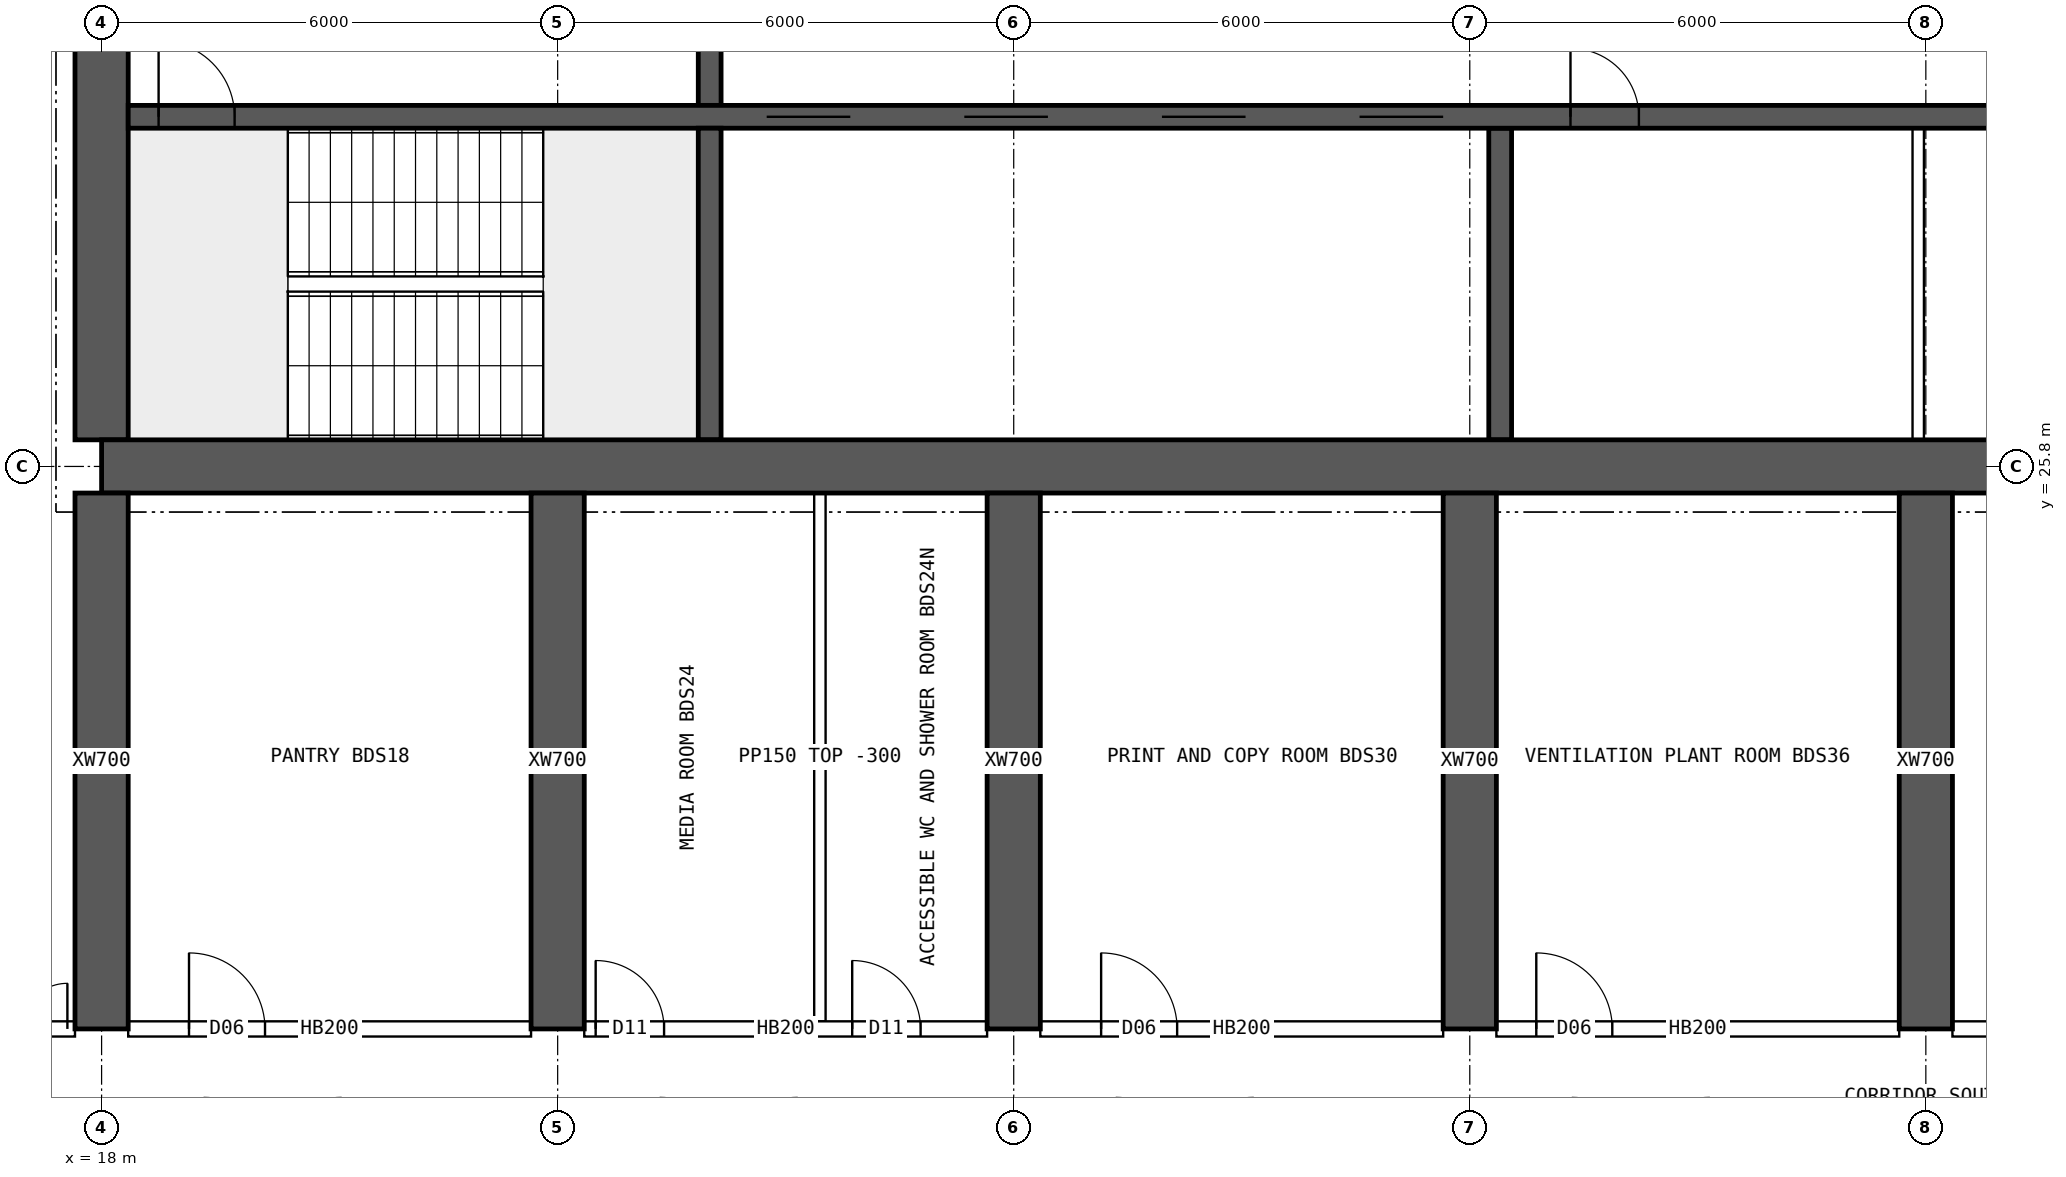
"""IFC4 building model, lengths in metres.
Left out: names, types, materials, properties, quantities, classifications, styles, units other than length and angle.
Written with IfcOpenShell. Run it as: python <this file> out.ifc"""

import sys

from ifc_helpers import new_model, si_unit, direction, frame, frame_2d, origin, place, context, subcontext, project, spatial, rectangle, extrude, element, fill, save


model = new_model("IFC4")
c1 = context("Model", 3, precision=1e-05, world=origin(), true_north=direction((0.0, 1.0)))
c2 = subcontext(c1, "Body", "Model", "MODEL_VIEW")
j1 = project(units=[si_unit("LENGTHUNIT", "METRE"), si_unit("PLANEANGLEUNIT", "RADIAN")], contexts=[c1])
p1 = place(None, origin())
s1 = spatial("IfcSite", under=j1, at=p1, CompositionType="ELEMENT")
p2 = place(p1, origin())
s2 = spatial("IfcBuilding", under=s1, at=p2, CompositionType="ELEMENT")
p3 = place(p2, frame((0.0, 0.0, 257.8)))
s3 = spatial("IfcBuildingStorey", under=s2, at=p3, CompositionType="ELEMENT", Elevation=257.8)
p4 = place(p3, frame((18.0, 25.8, 0.0), z_axis=(0.0, 0.0, 1.0), x_axis=(1.0, 0.0, 0.0)))
e1 = element("IfcWall", 1, at=p4, inside=s3, PredefinedType="SHEAR", context=c2, shape_type="SweptSolid", body=[
    extrude(rectangle(XDim=48.0, YDim=0.7, at=frame_2d((24.0, 0.0))), origin(), (0.0, 0.0, 1.0), 4.5),
])
p5 = place(p3, frame((18.0, 26.15, 0.0), z_axis=(0.0, 0.0, 1.0), x_axis=(0.0, 1.0, 0.0)))
e2 = element("IfcWall", 2, at=p5, inside=s3, PredefinedType="SHEAR", context=c2, shape_type="SweptSolid", body=[
    extrude(rectangle(XDim=11.7, YDim=0.7, at=frame_2d((5.85, 0.0))), origin(), (0.0, 0.0, 1.0), 4.5),
])
p6 = place(p5, frame((5.15, 0.0, 0.0)))
e3 = element("IfcOpeningElement", 3, at=p6, cuts=e2, PredefinedType="OPENING", context=c2, shape_type="SweptSolid", body=[
    extrude(rectangle(XDim=1.2, YDim=2.1, at=frame_2d((0.6, 1.05))), frame((0.0, 0.36, 0.0), z_axis=(0.0, -1.0, 0.0), x_axis=(1.0, 0.0, 0.0)), (0.0, 0.0, 1.0), 0.72),
])
p7 = place(p3, frame((18.35, 30.4, 0.0), z_axis=(0.0, 0.0, 1.0), x_axis=(1.0, 0.0, 0.0)))
e4 = element("IfcWall", 4, at=p7, inside=s3, PredefinedType="SHEAR", context=c2, shape_type="SweptSolid", body=[
    extrude(rectangle(XDim=47.3, YDim=0.3, at=frame_2d((23.65, 0.0))), origin(), (0.0, 0.0, 1.0), 4.5),
])
p8 = place(p7, frame((0.4, 0.0, 0.0)))
e5 = element("IfcOpeningElement", 5, at=p8, cuts=e4, PredefinedType="OPENING", context=c2, shape_type="SweptSolid", body=[
    extrude(rectangle(XDim=1.0, YDim=2.1, at=frame_2d((0.5, 1.05))), frame((0.0, 0.16, 0.0), z_axis=(0.0, -1.0, 0.0), x_axis=(1.0, 0.0, 0.0)), (0.0, 0.0, 1.0), 0.32),
])
p9 = place(p7, frame((45.9, 0.0, 0.0)))
e6 = element("IfcOpeningElement", 6, at=p9, cuts=e4, PredefinedType="OPENING", context=c2, shape_type="SweptSolid", body=[
    extrude(rectangle(XDim=1.0, YDim=2.1, at=frame_2d((0.5, 1.05))), frame((0.0, 0.16, 0.0), z_axis=(0.0, -1.0, 0.0), x_axis=(1.0, 0.0, 0.0)), (0.0, 0.0, 1.0), 0.32),
])
p10 = place(p7, frame((8.4, 0.0, 0.0)))
e7 = element("IfcOpeningElement", 7, at=p10, cuts=e4, PredefinedType="OPENING", context=c2, shape_type="SweptSolid", body=[
    extrude(rectangle(XDim=1.1, YDim=2.1, at=frame_2d((0.55, 1.05))), frame((0.0, 0.16, 0.0), z_axis=(0.0, -1.0, 0.0), x_axis=(1.0, 0.0, 0.0)), (0.0, 0.0, 1.0), 0.32),
])
p11 = place(p7, frame((11.0, 0.0, 0.0)))
e8 = element("IfcOpeningElement", 8, at=p11, cuts=e4, PredefinedType="OPENING", context=c2, shape_type="SweptSolid", body=[
    extrude(rectangle(XDim=1.1, YDim=2.1, at=frame_2d((0.55, 1.05))), frame((0.0, 0.16, 0.0), z_axis=(0.0, -1.0, 0.0), x_axis=(1.0, 0.0, 0.0)), (0.0, 0.0, 1.0), 0.32),
])
p12 = place(p7, frame((13.6, 0.0, 0.0)))
e9 = element("IfcOpeningElement", 9, at=p12, cuts=e4, PredefinedType="OPENING", context=c2, shape_type="SweptSolid", body=[
    extrude(rectangle(XDim=1.1, YDim=2.1, at=frame_2d((0.55, 1.05))), frame((0.0, 0.16, 0.0), z_axis=(0.0, -1.0, 0.0), x_axis=(1.0, 0.0, 0.0)), (0.0, 0.0, 1.0), 0.32),
])
p13 = place(p7, frame((16.2, 0.0, 0.0)))
e10 = element("IfcOpeningElement", 10, at=p13, cuts=e4, PredefinedType="OPENING", context=c2, shape_type="SweptSolid", body=[
    extrude(rectangle(XDim=1.1, YDim=2.1, at=frame_2d((0.55, 1.05))), frame((0.0, 0.16, 0.0), z_axis=(0.0, -1.0, 0.0), x_axis=(1.0, 0.0, 0.0)), (0.0, 0.0, 1.0), 0.32),
])
p14 = place(p7, frame((18.975, 0.0, 0.0)))
e11 = element("IfcOpeningElement", 11, at=p14, cuts=e4, PredefinedType="OPENING", context=c2, shape_type="SweptSolid", body=[
    extrude(rectangle(XDim=0.9, YDim=2.1, at=frame_2d((0.45, 1.05))), frame((0.0, 0.16, 0.0), z_axis=(0.0, -1.0, 0.0), x_axis=(1.0, 0.0, 0.0)), (0.0, 0.0, 1.0), 0.32),
])
p15 = place(p7, frame((24.475, 0.0, 0.0)))
e12 = element("IfcOpeningElement", 12, at=p15, cuts=e4, PredefinedType="OPENING", context=c2, shape_type="SweptSolid", body=[
    extrude(rectangle(XDim=0.9, YDim=2.1, at=frame_2d((0.45, 1.05))), frame((0.0, 0.16, 0.0), z_axis=(0.0, -1.0, 0.0), x_axis=(1.0, 0.0, 0.0)), (0.0, 0.0, 1.0), 0.32),
])
p16 = place(p7, frame((30.267, 0.0, 0.0)))
e13 = element("IfcOpeningElement", 13, at=p16, cuts=e4, PredefinedType="OPENING", context=c2, shape_type="SweptSolid", body=[
    extrude(rectangle(XDim=1.1, YDim=2.1, at=frame_2d((0.55, 1.05))), frame((0.0, 0.16, 0.0), z_axis=(0.0, -1.0, 0.0), x_axis=(1.0, 0.0, 0.0)), (0.0, 0.0, 1.0), 0.32),
])
p17 = place(p7, frame((33.8, 0.0, 0.0)))
e14 = element("IfcOpeningElement", 14, at=p17, cuts=e4, PredefinedType="OPENING", context=c2, shape_type="SweptSolid", body=[
    extrude(rectangle(XDim=1.1, YDim=2.1, at=frame_2d((0.55, 1.05))), frame((0.0, 0.16, 0.0), z_axis=(0.0, -1.0, 0.0), x_axis=(1.0, 0.0, 0.0)), (0.0, 0.0, 1.0), 0.32),
])
p18 = place(p7, frame((37.333, 0.0, 0.0)))
e15 = element("IfcOpeningElement", 15, at=p18, cuts=e4, PredefinedType="OPENING", context=c2, shape_type="SweptSolid", body=[
    extrude(rectangle(XDim=1.1, YDim=2.1, at=frame_2d((0.55, 1.05))), frame((0.0, 0.16, 0.0), z_axis=(0.0, -1.0, 0.0), x_axis=(1.0, 0.0, 0.0)), (0.0, 0.0, 1.0), 0.32),
])
p19 = place(p3, frame((26.0, 26.15, 0.0), z_axis=(0.0, 0.0, 1.0), x_axis=(0.0, 1.0, 0.0)))
e16 = element("IfcWall", 16, at=p19, inside=s3, PredefinedType="SHEAR", context=c2, shape_type="SweptSolid", body=[
    extrude(rectangle(XDim=4.1, YDim=0.3, at=frame_2d((2.05, 0.0))), origin(), (0.0, 0.0, 1.0), 4.5),
])
p20 = place(p3, frame((26.0, 30.55, 0.0), z_axis=(0.0, 0.0, 1.0), x_axis=(0.0, 1.0, 0.0)))
e17 = element("IfcWall", 17, at=p20, inside=s3, PredefinedType="SHEAR", context=c2, shape_type="SweptSolid", body=[
    extrude(rectangle(XDim=3.9, YDim=0.3, at=frame_2d((1.95, 0.0))), origin(), (0.0, 0.0, 1.0), 4.5),
])
p21 = place(p20, frame((1.4, 0.0, 0.0)))
e18 = element("IfcOpeningElement", 18, at=p21, cuts=e17, PredefinedType="OPENING", context=c2, shape_type="SweptSolid", body=[
    extrude(rectangle(XDim=1.2, YDim=2.1, at=frame_2d((0.6, 1.05))), frame((0.0, 0.16, 0.0), z_axis=(0.0, -1.0, 0.0), x_axis=(1.0, 0.0, 0.0)), (0.0, 0.0, 1.0), 0.32),
])
p22 = place(p3, frame((36.4, 26.15, 0.0), z_axis=(0.0, 0.0, 1.0), x_axis=(0.0, 1.0, 0.0)))
e19 = element("IfcWall", 19, at=p22, inside=s3, PredefinedType="SHEAR", context=c2, shape_type="SweptSolid", body=[
    extrude(rectangle(XDim=4.1, YDim=0.3, at=frame_2d((2.05, 0.0))), origin(), (0.0, 0.0, 1.0), 4.5),
])
for number, where, z_axis, x_axis in (
    (20, (18.0, 18.4, 0.0), (0.0, 0.0, 1.0), (0.0, 1.0, 0.0)),
    (21, (24.0, 18.4, 0.0), (0.0, 0.0, 1.0), (0.0, 1.0, 0.0)),
    (22, (30.0, 18.4, 0.0), (0.0, 0.0, 1.0), (0.0, 1.0, 0.0)),
    (23, (36.0, 18.4, 0.0), (0.0, 0.0, 1.0), (0.0, 1.0, 0.0)),
    (24, (42.0, 18.4, 0.0), (0.0, 0.0, 1.0), (0.0, 1.0, 0.0)),
):
    element("IfcWall", number, at=place(p3, frame(where, z_axis=z_axis, x_axis=x_axis)), inside=s3, PredefinedType="SHEAR", context=c2, shape_type="SweptSolid", body=[
        extrude(rectangle(XDim=7.05, YDim=0.7, at=frame_2d((3.525, 0.0))), origin(), (0.0, 0.0, 1.0), 4.5),
    ])
p23 = place(p3, frame((41.9, 26.15, 0.0), z_axis=(0.0, 0.0, 1.0), x_axis=(0.0, 1.0, 0.0)))
e25 = element("IfcWall", 25, at=p23, inside=s3, PredefinedType="SOLIDWALL", context=c2, shape_type="SweptSolid", body=[
    extrude(rectangle(XDim=4.1, YDim=0.15, at=frame_2d((2.05, 0.0))), origin(), (0.0, 0.0, 1.0), 4.2),
])
p24 = place(p3, frame((15.6, 18.4, 0.0), z_axis=(0.0, 0.0, 1.0), x_axis=(1.0, 0.0, 0.0)))
e26 = element("IfcWall", 26, at=p24, inside=s3, PredefinedType="SOLIDWALL", context=c2, shape_type="SweptSolid", body=[
    extrude(rectangle(XDim=2.05, YDim=0.2, at=frame_2d((1.025, 0.0))), origin(), (0.0, 0.0, 1.0), 4.2),
])
p25 = place(p24, frame((0.75, 0.0, 0.0)))
e27 = element("IfcOpeningElement", 27, at=p25, cuts=e26, PredefinedType="OPENING", context=c2, shape_type="SweptSolid", body=[
    extrude(rectangle(XDim=1.2, YDim=2.1, at=frame_2d((0.6, 1.05))), frame((0.0, 0.11, 0.0), z_axis=(0.0, -1.0, 0.0), x_axis=(1.0, 0.0, 0.0)), (0.0, 0.0, 1.0), 0.22),
])
p26 = place(p3, frame((18.35, 18.4, 0.0), z_axis=(0.0, 0.0, 1.0), x_axis=(1.0, 0.0, 0.0)))
e28 = element("IfcWall", 28, at=p26, inside=s3, PredefinedType="SOLIDWALL", context=c2, shape_type="SweptSolid", body=[
    extrude(rectangle(XDim=5.3, YDim=0.2, at=frame_2d((2.65, 0.0))), origin(), (0.0, 0.0, 1.0), 4.2),
])
p27 = place(p26, frame((0.8, 0.0, 0.0)))
e29 = element("IfcOpeningElement", 29, at=p27, cuts=e28, PredefinedType="OPENING", context=c2, shape_type="SweptSolid", body=[
    extrude(rectangle(XDim=1.0, YDim=2.1, at=frame_2d((0.5, 1.05))), frame((0.0, 0.11, 0.0), z_axis=(0.0, -1.0, 0.0), x_axis=(1.0, 0.0, 0.0)), (0.0, 0.0, 1.0), 0.22),
])
p28 = place(p3, frame((24.35, 18.4, 0.0), z_axis=(0.0, 0.0, 1.0), x_axis=(1.0, 0.0, 0.0)))
e30 = element("IfcWall", 30, at=p28, inside=s3, PredefinedType="SOLIDWALL", context=c2, shape_type="SweptSolid", body=[
    extrude(rectangle(XDim=5.3, YDim=0.2, at=frame_2d((2.65, 0.0))), origin(), (0.0, 0.0, 1.0), 4.2),
])
p29 = place(p28, frame((0.15, 0.0, 0.0)))
e31 = element("IfcOpeningElement", 31, at=p29, cuts=e30, PredefinedType="OPENING", context=c2, shape_type="SweptSolid", body=[
    extrude(rectangle(XDim=0.9, YDim=2.1, at=frame_2d((0.45, 1.05))), frame((0.0, 0.11, 0.0), z_axis=(0.0, -1.0, 0.0), x_axis=(1.0, 0.0, 0.0)), (0.0, 0.0, 1.0), 0.22),
])
p30 = place(p28, frame((3.525, 0.0, 0.0)))
e32 = element("IfcOpeningElement", 32, at=p30, cuts=e30, PredefinedType="OPENING", context=c2, shape_type="SweptSolid", body=[
    extrude(rectangle(XDim=0.9, YDim=2.1, at=frame_2d((0.45, 1.05))), frame((0.0, 0.11, 0.0), z_axis=(0.0, -1.0, 0.0), x_axis=(1.0, 0.0, 0.0)), (0.0, 0.0, 1.0), 0.22),
])
p31 = place(p3, frame((30.35, 18.4, 0.0), z_axis=(0.0, 0.0, 1.0), x_axis=(1.0, 0.0, 0.0)))
e33 = element("IfcWall", 33, at=p31, inside=s3, PredefinedType="SOLIDWALL", context=c2, shape_type="SweptSolid", body=[
    extrude(rectangle(XDim=5.3, YDim=0.2, at=frame_2d((2.65, 0.0))), origin(), (0.0, 0.0, 1.0), 4.2),
])
p32 = place(p31, frame((0.8, 0.0, 0.0)))
e34 = element("IfcOpeningElement", 34, at=p32, cuts=e33, PredefinedType="OPENING", context=c2, shape_type="SweptSolid", body=[
    extrude(rectangle(XDim=1.0, YDim=2.1, at=frame_2d((0.5, 1.05))), frame((0.0, 0.11, 0.0), z_axis=(0.0, -1.0, 0.0), x_axis=(1.0, 0.0, 0.0)), (0.0, 0.0, 1.0), 0.22),
])
p33 = place(p3, frame((36.35, 18.4, 0.0), z_axis=(0.0, 0.0, 1.0), x_axis=(1.0, 0.0, 0.0)))
e35 = element("IfcWall", 35, at=p33, inside=s3, PredefinedType="SOLIDWALL", context=c2, shape_type="SweptSolid", body=[
    extrude(rectangle(XDim=5.3, YDim=0.2, at=frame_2d((2.65, 0.0))), origin(), (0.0, 0.0, 1.0), 4.2),
])
p34 = place(p33, frame((0.525, 0.0, 0.0)))
e36 = element("IfcOpeningElement", 36, at=p34, cuts=e35, PredefinedType="OPENING", context=c2, shape_type="SweptSolid", body=[
    extrude(rectangle(XDim=1.0, YDim=2.1, at=frame_2d((0.5, 1.05))), frame((0.0, 0.11, 0.0), z_axis=(0.0, -1.0, 0.0), x_axis=(1.0, 0.0, 0.0)), (0.0, 0.0, 1.0), 0.22),
])
p35 = place(p3, frame((42.35, 18.4, 0.0), z_axis=(0.0, 0.0, 1.0), x_axis=(1.0, 0.0, 0.0)))
e37 = element("IfcWall", 37, at=p35, inside=s3, PredefinedType="SOLIDWALL", context=c2, shape_type="SweptSolid", body=[
    extrude(rectangle(XDim=5.3, YDim=0.2, at=frame_2d((2.65, 0.0))), origin(), (0.0, 0.0, 1.0), 4.2),
])
p36 = place(p35, frame((0.8, 0.0, 0.0)))
e38 = element("IfcOpeningElement", 38, at=p36, cuts=e37, PredefinedType="OPENING", context=c2, shape_type="SweptSolid", body=[
    extrude(rectangle(XDim=1.0, YDim=2.1, at=frame_2d((0.5, 1.05))), frame((0.0, 0.11, 0.0), z_axis=(0.0, -1.0, 0.0), x_axis=(1.0, 0.0, 0.0)), (0.0, 0.0, 1.0), 0.22),
])
p37 = place(p3, frame((27.45, 18.5, 0.0), z_axis=(0.0, 0.0, 1.0), x_axis=(0.0, 1.0, 0.0)))
e39 = element("IfcWall", 39, at=p37, inside=s3, PredefinedType="PARTITIONING", context=c2, shape_type="SweptSolid", body=[
    extrude(rectangle(XDim=6.95, YDim=0.15, at=frame_2d((3.475, 0.0))), origin(), (0.0, 0.0, 1.0), 4.2),
])
p38 = place(p8, origin())
e40 = element("IfcDoor", 40, at=p38, inside=s3, OperationType="SINGLE_SWING_LEFT", PredefinedType="DOOR", context=c2, shape_type="SweptSolid", body=[
    extrude(rectangle(XDim=1.0, YDim=2.1, at=frame_2d((0.5, 1.05))), frame((0.0, 0.025, 0.0), z_axis=(0.0, -1.0, 0.0), x_axis=(1.0, 0.0, 0.0)), (0.0, 0.0, 1.0), 0.05),
])
fill(e5, e40)
p39 = place(p10, origin())
e41 = element("IfcDoor", 41, at=p39, inside=s3, OperationType="DOUBLE_DOOR_SLIDING", PredefinedType="DOOR", context=c2, shape_type="SweptSolid", body=[
    extrude(rectangle(XDim=1.1, YDim=2.1, at=frame_2d((0.55, 1.05))), frame((0.0, 0.025, 0.0), z_axis=(0.0, -1.0, 0.0), x_axis=(1.0, 0.0, 0.0)), (0.0, 0.0, 1.0), 0.05),
])
fill(e7, e41)
p40 = place(p11, origin())
e42 = element("IfcDoor", 42, at=p40, inside=s3, OperationType="DOUBLE_DOOR_SLIDING", PredefinedType="DOOR", context=c2, shape_type="SweptSolid", body=[
    extrude(rectangle(XDim=1.1, YDim=2.1, at=frame_2d((0.55, 1.05))), frame((0.0, 0.025, 0.0), z_axis=(0.0, -1.0, 0.0), x_axis=(1.0, 0.0, 0.0)), (0.0, 0.0, 1.0), 0.05),
])
fill(e8, e42)
p41 = place(p12, origin())
e43 = element("IfcDoor", 43, at=p41, inside=s3, OperationType="DOUBLE_DOOR_SLIDING", PredefinedType="DOOR", context=c2, shape_type="SweptSolid", body=[
    extrude(rectangle(XDim=1.1, YDim=2.1, at=frame_2d((0.55, 1.05))), frame((0.0, 0.025, 0.0), z_axis=(0.0, -1.0, 0.0), x_axis=(1.0, 0.0, 0.0)), (0.0, 0.0, 1.0), 0.05),
])
fill(e9, e43)
p42 = place(p13, origin())
e44 = element("IfcDoor", 44, at=p42, inside=s3, OperationType="DOUBLE_DOOR_SLIDING", PredefinedType="DOOR", context=c2, shape_type="SweptSolid", body=[
    extrude(rectangle(XDim=1.1, YDim=2.1, at=frame_2d((0.55, 1.05))), frame((0.0, 0.025, 0.0), z_axis=(0.0, -1.0, 0.0), x_axis=(1.0, 0.0, 0.0)), (0.0, 0.0, 1.0), 0.05),
])
fill(e10, e44)
p43 = place(p14, origin())
e45 = element("IfcDoor", 45, at=p43, inside=s3, OperationType="SINGLE_SWING_LEFT", PredefinedType="DOOR", context=c2, shape_type="SweptSolid", body=[
    extrude(rectangle(XDim=0.9, YDim=2.1, at=frame_2d((0.45, 1.05))), frame((0.0, 0.025, 0.0), z_axis=(0.0, -1.0, 0.0), x_axis=(1.0, 0.0, 0.0)), (0.0, 0.0, 1.0), 0.05),
])
fill(e11, e45)
p44 = place(p25, origin())
e46 = element("IfcDoor", 46, at=p44, inside=s3, OperationType="DOUBLE_DOOR_SINGLE_SWING", PredefinedType="DOOR", context=c2, shape_type="SweptSolid", body=[
    extrude(rectangle(XDim=1.2, YDim=2.1, at=frame_2d((0.6, 1.05))), frame((0.0, 0.025, 0.0), z_axis=(0.0, -1.0, 0.0), x_axis=(1.0, 0.0, 0.0)), (0.0, 0.0, 1.0), 0.05),
])
fill(e27, e46)
p45 = place(p27, origin())
e47 = element("IfcDoor", 47, at=p45, inside=s3, OperationType="SINGLE_SWING_LEFT", PredefinedType="DOOR", context=c2, shape_type="SweptSolid", body=[
    extrude(rectangle(XDim=1.0, YDim=2.1, at=frame_2d((0.5, 1.05))), frame((0.0, 0.025, 0.0), z_axis=(0.0, -1.0, 0.0), x_axis=(1.0, 0.0, 0.0)), (0.0, 0.0, 1.0), 0.05),
])
fill(e29, e47)
p46 = place(p29, origin())
e48 = element("IfcDoor", 48, at=p46, inside=s3, OperationType="SINGLE_SWING_LEFT", PredefinedType="DOOR", context=c2, shape_type="SweptSolid", body=[
    extrude(rectangle(XDim=0.9, YDim=2.1, at=frame_2d((0.45, 1.05))), frame((0.0, 0.025, 0.0), z_axis=(0.0, -1.0, 0.0), x_axis=(1.0, 0.0, 0.0)), (0.0, 0.0, 1.0), 0.05),
])
fill(e31, e48)
p47 = place(p30, origin())
e49 = element("IfcDoor", 49, at=p47, inside=s3, OperationType="SINGLE_SWING_LEFT", PredefinedType="DOOR", context=c2, shape_type="SweptSolid", body=[
    extrude(rectangle(XDim=0.9, YDim=2.1, at=frame_2d((0.45, 1.05))), frame((0.0, 0.025, 0.0), z_axis=(0.0, -1.0, 0.0), x_axis=(1.0, 0.0, 0.0)), (0.0, 0.0, 1.0), 0.05),
])
fill(e32, e49)
p48 = place(p32, origin())
e50 = element("IfcDoor", 50, at=p48, inside=s3, OperationType="SINGLE_SWING_LEFT", PredefinedType="DOOR", context=c2, shape_type="SweptSolid", body=[
    extrude(rectangle(XDim=1.0, YDim=2.1, at=frame_2d((0.5, 1.05))), frame((0.0, 0.025, 0.0), z_axis=(0.0, -1.0, 0.0), x_axis=(1.0, 0.0, 0.0)), (0.0, 0.0, 1.0), 0.05),
])
fill(e34, e50)
p49 = place(p34, origin())
e51 = element("IfcDoor", 51, at=p49, inside=s3, OperationType="SINGLE_SWING_LEFT", PredefinedType="DOOR", context=c2, shape_type="SweptSolid", body=[
    extrude(rectangle(XDim=1.0, YDim=2.1, at=frame_2d((0.5, 1.05))), frame((0.0, 0.025, 0.0), z_axis=(0.0, -1.0, 0.0), x_axis=(1.0, 0.0, 0.0)), (0.0, 0.0, 1.0), 0.05),
])
fill(e36, e51)
save(model, sys.argv[1])
